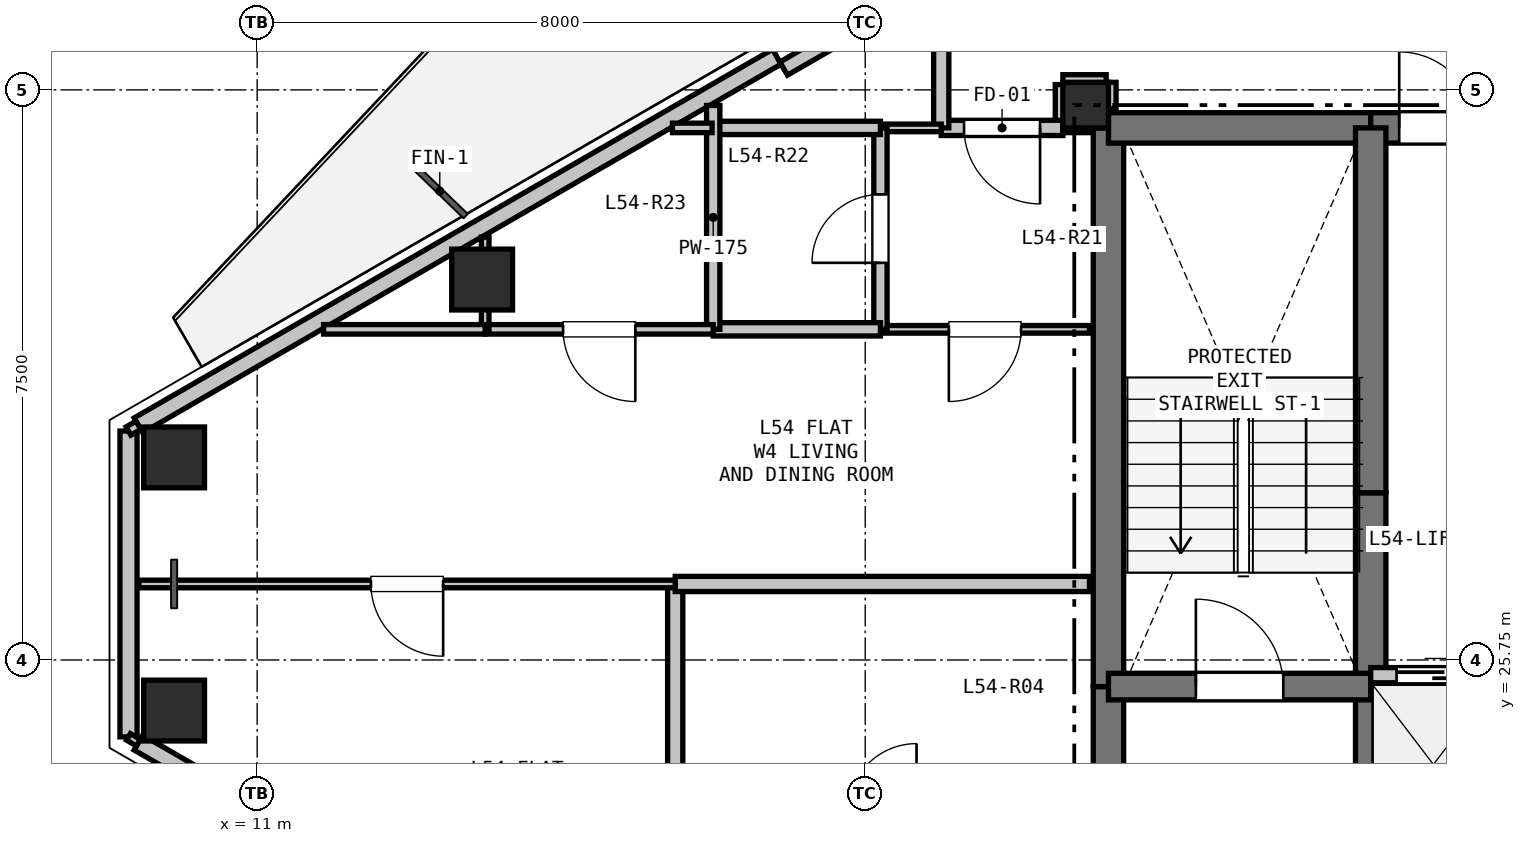
"""IFC4 building model, lengths in metres.
Left out: names, types, materials, properties, quantities, classifications, styles, units other than length and angle.
Written with IfcOpenShell. Run it as: python <this file> out.ifc"""

import sys

from ifc_helpers import new_model, si_unit, direction, frame, frame_2d, origin, origin_2d, place, context, subcontext, project, spatial, rectangle, hollow_rectangle, extrude, element, fill, save


model = new_model("IFC4")
c1 = context("Model", 3, precision=1e-05, world=origin(), true_north=direction((0.0, 1.0)))
c2 = subcontext(c1, "Body", "Model", "MODEL_VIEW")
j1 = project(units=[si_unit("LENGTHUNIT", "METRE"), si_unit("PLANEANGLEUNIT", "RADIAN")], contexts=[c1])
p1 = place(None, origin())
s1 = spatial("IfcSite", under=j1, at=p1, CompositionType="ELEMENT")
p2 = place(p1, origin())
s2 = spatial("IfcBuilding", under=s1, at=p2, CompositionType="ELEMENT")
p3 = place(p2, frame((0.0, 0.0, 195.3)))
s3 = spatial("IfcBuildingStorey", under=s2, at=p3, CompositionType="ELEMENT", Elevation=195.3)
p4 = place(p3, frame((21.9, 33.05, 0.0), z_axis=(0.0, 0.0, 1.0), x_axis=(1.0, 0.0, 0.0)))
e1 = element("IfcColumn", 1, at=p4, inside=s3, PredefinedType="COLUMN", context=c2, shape_type="SweptSolid", body=[
    extrude(rectangle(XDim=0.6, YDim=0.6, at=origin_2d()), origin(), (0.0, 0.0, 1.0), 3.3),
])
for number, where, z_axis, x_axis in (
    (2, (9.907, 28.415, 0.0), (0.0, 0.0, 1.0), (1.0, 0.0, 0.0)),
    (3, (13.96, 30.755, 0.0), (0.0, 0.0, 1.0), (1.0, 0.0, 0.0)),
    (4, (9.907, 25.085, 0.0), (0.0, 0.0, 1.0), (1.0, 0.0, 0.0)),
):
    element("IfcColumn", number, at=place(p3, frame(where, z_axis=z_axis, x_axis=x_axis)), inside=s3, PredefinedType="COLUMN", context=c2, shape_type="SweptSolid", body=[
        extrude(hollow_rectangle(XDim=0.8, YDim=0.8, WallThickness=0.025, at=origin_2d()), origin(), (0.0, 0.0, 1.0), 3.3),
    ])
p5 = place(p3, frame((9.308, 24.738, 0.0), z_axis=(0.0, 0.0, 1.0), x_axis=(0.0, 1.0, 0.0)))
e5 = element("IfcWall", 5, at=p5, inside=s3, PredefinedType="SOLIDWALL", context=c2, shape_type="SweptSolid", body=[
    extrude(rectangle(XDim=4.023, YDim=0.225, at=frame_2d((2.012, 0.0))), origin(), (0.0, 0.0, 1.0), 2.69),
])
p6 = place(p3, frame((9.438, 28.837, 0.0), z_axis=(0.0, 0.0, 1.0), x_axis=(0.866027133173, 0.499997004599, 0.0)))
e6 = element("IfcWall", 6, at=p6, inside=s3, PredefinedType="SOLIDWALL", context=c2, shape_type="SweptSolid", body=[
    extrude(rectangle(XDim=9.699, YDim=0.225, at=frame_2d((4.849, 0.0))), origin(), (0.0, 0.0, 1.0), 2.69),
])
p7 = place(p3, frame((17.927, 33.53, 0.0), z_axis=(0.0, 0.0, 1.0), x_axis=(0.86605165483, 0.499954529098, 0.0)))
e7 = element("IfcWall", 7, at=p7, inside=s3, PredefinedType="PARAPET", context=c2, shape_type="SweptSolid", body=[
    extrude(rectangle(XDim=1.7, YDim=0.2, at=frame_2d((0.85, 0.0))), origin(), (0.0, 0.0, 1.0), 2.69),
])
p8 = place(p3, frame((17.837, 19.814, 0.0), z_axis=(0.0, 0.0, 1.0), x_axis=(-0.866027133173, 0.499997004599, 0.0)))
e8 = element("IfcWall", 8, at=p8, inside=s3, PredefinedType="SOLIDWALL", context=c2, shape_type="SweptSolid", body=[
    extrude(rectangle(XDim=9.699, YDim=0.225, at=frame_2d((4.849, 0.0))), origin(), (0.0, 0.0, 1.0), 2.69),
])
p9 = place(p8, frame((5.108, 0.0, 0.9)))
e9 = element("IfcOpeningElement", 9, at=p9, cuts=e8, PredefinedType="OPENING", context=c2, shape_type="SweptSolid", body=[
    extrude(rectangle(XDim=1.2, YDim=1.4, at=frame_2d((0.6, 0.7))), frame((0.0, 0.123, 0.0), z_axis=(0.0, -1.0, 0.0), x_axis=(1.0, 0.0, 0.0)), (0.0, 0.0, 1.0), 0.245),
])
p10 = place(p3, frame((22.2, 20.75, 0.0), z_axis=(0.0, 0.0, 1.0), x_axis=(0.0, 1.0, 0.0)))
e10 = element("IfcWall", 10, at=p10, inside=s3, PredefinedType="SHEAR", context=c2, shape_type="SweptSolid", body=[
    extrude(rectangle(XDim=4.65, YDim=0.4, at=frame_2d((2.325, 0.0))), origin(), (0.0, 0.0, 1.0), 3.07),
])
p11 = place(p3, frame((22.2, 25.4, 0.0), z_axis=(0.0, 0.0, 1.0), x_axis=(0.0, 1.0, 0.0)))
e11 = element("IfcWall", 11, at=p11, inside=s3, PredefinedType="SHEAR", context=c2, shape_type="SweptSolid", body=[
    extrude(rectangle(XDim=7.35, YDim=0.4, at=frame_2d((3.675, 0.0))), origin(), (0.0, 0.0, 1.0), 3.07),
])
p12 = place(p3, frame((22.2, 32.75, 0.0), z_axis=(0.0, 0.0, 1.0), x_axis=(1.0, 0.0, 0.0)))
e12 = element("IfcWall", 12, at=p12, inside=s3, PredefinedType="SHEAR", context=c2, shape_type="SweptSolid", body=[
    extrude(rectangle(XDim=3.45, YDim=0.4, at=frame_2d((1.725, 0.0))), origin(), (0.0, 0.0, 1.0), 3.07),
])
p13 = place(p3, frame((25.65, 32.75, 0.0), z_axis=(0.0, 0.0, 1.0), x_axis=(1.0, 0.0, 0.0)))
e13 = element("IfcWall", 13, at=p13, inside=s3, PredefinedType="SHEAR", context=c2, shape_type="SweptSolid", body=[
    extrude(rectangle(XDim=1.75, YDim=0.4, at=frame_2d((0.875, 0.0))), origin(), (0.0, 0.0, 1.0), 3.07),
])
p14 = place(p13, frame((0.375, 0.0, 0.0)))
e14 = element("IfcOpeningElement", 14, at=p14, cuts=e13, PredefinedType="OPENING", context=c2, shape_type="SweptSolid", body=[
    extrude(rectangle(XDim=1.0, YDim=2.15, at=frame_2d((0.5, 1.075))), frame((0.0, 0.21, 0.0), z_axis=(0.0, -1.0, 0.0), x_axis=(1.0, 0.0, 0.0)), (0.0, 0.0, 1.0), 0.42),
])
p15 = place(p3, frame((25.65, 22.75, 0.0), z_axis=(0.0, 0.0, 1.0), x_axis=(0.0, 1.0, 0.0)))
e15 = element("IfcWall", 15, at=p15, inside=s3, PredefinedType="SHEAR", context=c2, shape_type="SweptSolid", body=[
    extrude(rectangle(XDim=2.8, YDim=0.4, at=frame_2d((1.4, 0.0))), origin(), (0.0, 0.0, 1.0), 3.07),
])
p16 = place(p3, frame((25.65, 25.55, 0.0), z_axis=(0.0, 0.0, 1.0), x_axis=(0.0, 1.0, 0.0)))
e16 = element("IfcWall", 16, at=p16, inside=s3, PredefinedType="SHEAR", context=c2, shape_type="SweptSolid", body=[
    extrude(rectangle(XDim=2.4, YDim=0.4, at=frame_2d((1.2, 0.0))), origin(), (0.0, 0.0, 1.0), 3.07),
])
p17 = place(p3, frame((25.65, 27.95, 0.0), z_axis=(0.0, 0.0, 1.0), x_axis=(0.0, 1.0, 0.0)))
e17 = element("IfcWall", 17, at=p17, inside=s3, PredefinedType="SHEAR", context=c2, shape_type="SweptSolid", body=[
    extrude(rectangle(XDim=4.8, YDim=0.4, at=frame_2d((2.4, 0.0))), origin(), (0.0, 0.0, 1.0), 3.07),
])
p18 = place(p3, frame((22.2, 25.4, 0.0), z_axis=(0.0, 0.0, 1.0), x_axis=(1.0, 0.0, 0.0)))
e18 = element("IfcWall", 18, at=p18, inside=s3, PredefinedType="SHEAR", context=c2, shape_type="SweptSolid", body=[
    extrude(rectangle(XDim=3.45, YDim=0.35, at=frame_2d((1.725, 0.0))), origin(), (0.0, 0.0, 1.0), 3.07),
])
p19 = place(p18, frame((1.15, 0.0, 0.0)))
e19 = element("IfcOpeningElement", 19, at=p19, cuts=e18, PredefinedType="OPENING", context=c2, shape_type="SweptSolid", body=[
    extrude(rectangle(XDim=1.15, YDim=2.15, at=frame_2d((0.575, 1.075))), frame((0.0, 0.185, 0.0), z_axis=(0.0, -1.0, 0.0), x_axis=(1.0, 0.0, 0.0)), (0.0, 0.0, 1.0), 0.37),
])
p20 = place(p3, frame((25.65, 25.55, 0.0), z_axis=(0.0, 0.0, 1.0), x_axis=(1.0, 0.0, 0.0)))
e20 = element("IfcWall", 20, at=p20, inside=s3, PredefinedType="PARTITIONING", context=c2, shape_type="SweptSolid", body=[
    extrude(rectangle(XDim=4.95, YDim=0.2, at=frame_2d((2.475, 0.0))), origin(), (0.0, 0.0, 1.0), 3.07),
])
p21 = place(p20, frame((0.34, 0.0, 0.0)))
e21 = element("IfcOpeningElement", 21, at=p21, cuts=e20, PredefinedType="OPENING", context=c2, shape_type="SweptSolid", body=[
    extrude(rectangle(XDim=1.1, YDim=2.15, at=frame_2d((0.55, 1.075))), frame((0.0, 0.11, 0.0), z_axis=(0.0, -1.0, 0.0), x_axis=(1.0, 0.0, 0.0)), (0.0, 0.0, 1.0), 0.22),
])
p22 = place(p20, frame((1.99, 0.0, 0.0)))
e22 = element("IfcOpeningElement", 22, at=p22, cuts=e20, PredefinedType="OPENING", context=c2, shape_type="SweptSolid", body=[
    extrude(rectangle(XDim=1.1, YDim=2.15, at=frame_2d((0.55, 1.075))), frame((0.0, 0.11, 0.0), z_axis=(0.0, -1.0, 0.0), x_axis=(1.0, 0.0, 0.0)), (0.0, 0.0, 1.0), 0.22),
])
p23 = place(p20, frame((3.64, 0.0, 0.0)))
e23 = element("IfcOpeningElement", 23, at=p23, cuts=e20, PredefinedType="OPENING", context=c2, shape_type="SweptSolid", body=[
    extrude(rectangle(XDim=1.1, YDim=2.15, at=frame_2d((0.55, 1.075))), frame((0.0, 0.11, 0.0), z_axis=(0.0, -1.0, 0.0), x_axis=(1.0, 0.0, 0.0)), (0.0, 0.0, 1.0), 0.22),
])
p24 = place(p3, frame((22.2, 33.0, 0.0), z_axis=(0.0, 0.0, 1.0), x_axis=(0.0, 1.0, 0.0)))
e24 = element("IfcWall", 24, at=p24, inside=s3, PredefinedType="PARTITIONING", context=c2, shape_type="SweptSolid", body=[
    extrude(rectangle(XDim=0.35, YDim=0.2, at=frame_2d((0.175, 0.0))), origin(), (0.0, 0.0, 1.0), 2.595),
])
p25 = place(p3, frame((22.17, 33.35, 0.0), z_axis=(0.0, 0.0, 1.0), x_axis=(-1.0, 0.0, 0.0)))
e25 = element("IfcWall", 25, at=p25, inside=s3, PredefinedType="PARTITIONING", context=c2, shape_type="SweptSolid", body=[
    extrude(rectangle(XDim=0.57, YDim=0.2, at=frame_2d((0.285, 0.0))), origin(), (0.0, 0.0, 1.0), 3.07),
])
p26 = place(p3, frame((21.6, 33.32, 0.0), z_axis=(0.0, 0.0, 1.0), x_axis=(0.0, -1.0, 0.0)))
e26 = element("IfcWall", 26, at=p26, inside=s3, PredefinedType="PARTITIONING", context=c2, shape_type="SweptSolid", body=[
    extrude(rectangle(XDim=0.57, YDim=0.2, at=frame_2d((0.285, 0.0))), origin(), (0.0, 0.0, 1.0), 2.518),
])
p27 = place(p3, frame((21.6, 32.75, 0.0), z_axis=(0.0, 0.0, 1.0), x_axis=(-1.0, 0.0, 0.0)))
e27 = element("IfcWall", 27, at=p27, inside=s3, PredefinedType="PARTITIONING", context=c2, shape_type="SweptSolid", body=[
    extrude(rectangle(XDim=1.6, YDim=0.2, at=frame_2d((0.8, 0.0))), origin(), (0.0, 0.0, 1.0), 2.518),
])
p28 = place(p27, frame((0.3, 0.0, 0.0)))
e28 = element("IfcOpeningElement", 28, at=p28, cuts=e27, PredefinedType="OPENING", context=c2, shape_type="SweptSolid", body=[
    extrude(rectangle(XDim=1.0, YDim=2.15, at=frame_2d((0.5, 1.075))), frame((0.0, 0.11, 0.0), z_axis=(0.0, -1.0, 0.0), x_axis=(1.0, 0.0, 0.0)), (0.0, 0.0, 1.0), 0.22),
])
p29 = place(p3, frame((20.0, 32.75, 0.0), z_axis=(0.0, 0.0, 1.0), x_axis=(0.0, 1.0, 0.0)))
e29 = element("IfcWall", 29, at=p29, inside=s3, PredefinedType="PARTITIONING", context=c2, shape_type="SweptSolid", body=[
    extrude(rectangle(XDim=2.141, YDim=0.2, at=frame_2d((1.071, 0.0))), origin(), (0.0, 0.0, 1.0), 2.365),
])
p30 = place(p3, frame((19.2, 32.75, 0.0), z_axis=(0.0, 0.0, 1.0), x_axis=(1.0, 0.0, 0.0)))
e30 = element("IfcWall", 30, at=p30, inside=s3, PredefinedType="PARTITIONING", context=c2, shape_type="SweptSolid", body=[
    extrude(rectangle(XDim=0.8, YDim=0.1, at=frame_2d((0.4, 0.0))), origin(), (0.0, 0.0, 1.0), 3.07),
])
p31 = place(p3, frame((21.6, 32.75, 0.0), z_axis=(0.0, 0.0, 1.0), x_axis=(1.0, 0.0, 0.0)))
e31 = element("IfcWall", 31, at=p31, inside=s3, PredefinedType="PARTITIONING", context=c2, shape_type="SweptSolid", body=[
    extrude(rectangle(XDim=0.35, YDim=0.125, at=frame_2d((0.175, 0.0))), origin(), (0.0, 0.0, 1.0), 2.595),
])
p32 = place(p3, frame((21.95, 30.1, 0.0), z_axis=(0.0, 0.0, 1.0), x_axis=(-1.0, 0.0, 0.0)))
e32 = element("IfcWall", 32, at=p32, inside=s3, PredefinedType="PARTITIONING", context=c2, shape_type="SweptSolid", body=[
    extrude(rectangle(XDim=2.75, YDim=0.1, at=frame_2d((1.375, 0.0))), origin(), (0.0, 0.0, 1.0), 2.595),
])
p33 = place(p32, frame((0.9, 0.0, 0.0)))
e33 = element("IfcOpeningElement", 33, at=p33, cuts=e32, PredefinedType="OPENING", context=c2, shape_type="SweptSolid", body=[
    extrude(rectangle(XDim=0.95, YDim=2.1, at=frame_2d((0.475, 1.05))), frame((0.0, 0.06, 0.0), z_axis=(0.0, -1.0, 0.0), x_axis=(1.0, 0.0, 0.0)), (0.0, 0.0, 1.0), 0.12),
])
p34 = place(p3, frame((19.2, 30.1, 0.0), z_axis=(0.0, 0.0, 1.0), x_axis=(0.0, 1.0, 0.0)))
e34 = element("IfcWall", 34, at=p34, inside=s3, PredefinedType="PLUMBINGWALL", context=c2, shape_type="SweptSolid", body=[
    extrude(rectangle(XDim=2.65, YDim=0.175, at=frame_2d((1.325, 0.0))), origin(), (0.0, 0.0, 1.0), 2.518),
])
p35 = place(p34, frame((0.875, 0.0, 0.0)))
e35 = element("IfcOpeningElement", 35, at=p35, cuts=e34, PredefinedType="OPENING", context=c2, shape_type="SweptSolid", body=[
    extrude(rectangle(XDim=0.9, YDim=2.1, at=frame_2d((0.45, 1.05))), frame((0.0, 0.097, 0.0), z_axis=(0.0, -1.0, 0.0), x_axis=(1.0, 0.0, 0.0)), (0.0, 0.0, 1.0), 0.195),
])
p36 = place(p3, frame((17.0, 32.75, 0.0), z_axis=(0.0, 0.0, 1.0), x_axis=(1.0, 0.0, 0.0)))
e36 = element("IfcWall", 36, at=p36, inside=s3, PredefinedType="PLUMBINGWALL", context=c2, shape_type="SweptSolid", body=[
    extrude(rectangle(XDim=2.2, YDim=0.175, at=frame_2d((1.1, 0.0))), origin(), (0.0, 0.0, 1.0), 2.365),
])
p37 = place(p3, frame((19.2, 30.1, 0.0), z_axis=(0.0, 0.0, 1.0), x_axis=(-1.0, 0.0, 0.0)))
e37 = element("IfcWall", 37, at=p37, inside=s3, PredefinedType="PLUMBINGWALL", context=c2, shape_type="SweptSolid", body=[
    extrude(rectangle(XDim=2.2, YDim=0.175, at=frame_2d((1.1, 0.0))), origin(), (0.0, 0.0, 1.0), 3.07),
])
p38 = place(p3, frame((17.0, 30.1, 0.0), z_axis=(0.0, 0.0, 1.0), x_axis=(0.0, 1.0, 0.0)))
e38 = element("IfcWall", 38, at=p38, inside=s3, PredefinedType="PLUMBINGWALL", context=c2, shape_type="SweptSolid", body=[
    extrude(rectangle(XDim=2.945, YDim=0.175, at=frame_2d((1.473, 0.0))), origin(), (0.0, 0.0, 1.0), 2.365),
])
p39 = place(p3, frame((17.0, 30.1, 0.0), z_axis=(0.0, 0.0, 1.0), x_axis=(-1.0, 0.0, 0.0)))
e39 = element("IfcWall", 39, at=p39, inside=s3, PredefinedType="PARTITIONING", context=c2, shape_type="SweptSolid", body=[
    extrude(rectangle(XDim=3.0, YDim=0.125, at=frame_2d((1.5, 0.0))), origin(), (0.0, 0.0, 1.0), 3.07),
])
p40 = place(p39, frame((1.025, 0.0, 0.0)))
e40 = element("IfcOpeningElement", 40, at=p40, cuts=e39, PredefinedType="OPENING", context=c2, shape_type="SweptSolid", body=[
    extrude(rectangle(XDim=0.95, YDim=2.1, at=frame_2d((0.475, 1.05))), frame((0.0, 0.073, 0.0), z_axis=(0.0, -1.0, 0.0), x_axis=(1.0, 0.0, 0.0)), (0.0, 0.0, 1.0), 0.145),
])
p41 = place(p3, frame((14.0, 30.1, 0.0), z_axis=(0.0, 0.0, 1.0), x_axis=(0.0, 1.0, 0.0)))
e41 = element("IfcWall", 41, at=p41, inside=s3, PredefinedType="PARTITIONING", context=c2, shape_type="SweptSolid", body=[
    extrude(rectangle(XDim=1.213, YDim=0.1, at=frame_2d((0.606, 0.0))), origin(), (0.0, 0.0, 1.0), 3.07),
])
p42 = place(p3, frame((16.464, 32.75, 0.0), z_axis=(0.0, 0.0, 1.0), x_axis=(1.0, 0.0, 0.0)))
e42 = element("IfcWall", 42, at=p42, inside=s3, PredefinedType="PARTITIONING", context=c2, shape_type="SweptSolid", body=[
    extrude(rectangle(XDim=0.521, YDim=0.125, at=frame_2d((0.261, 0.0))), origin(), (0.0, 0.0, 1.0), 3.07),
])
p43 = place(p3, frame((16.5, 23.75, 0.0), z_axis=(0.0, 0.0, 1.0), x_axis=(0.0, 1.0, 0.0)))
e43 = element("IfcWall", 43, at=p43, inside=s3, PredefinedType="PARTITIONING", context=c2, shape_type="SweptSolid", body=[
    extrude(rectangle(XDim=3.0, YDim=0.2, at=frame_2d((1.5, 0.0))), origin(), (0.0, 0.0, 1.0), 3.07),
])
p44 = place(p3, frame((16.5, 26.75, 0.0), z_axis=(0.0, 0.0, 1.0), x_axis=(1.0, 0.0, 0.0)))
e44 = element("IfcWall", 44, at=p44, inside=s3, PredefinedType="PARTITIONING", context=c2, shape_type="SweptSolid", body=[
    extrude(rectangle(XDim=5.45, YDim=0.2, at=frame_2d((2.725, 0.0))), origin(), (0.0, 0.0, 1.0), 2.595),
])
p45 = place(p3, frame((11.874, 30.1, 0.0), z_axis=(0.0, 0.0, 1.0), x_axis=(1.0, 0.0, 0.0)))
e45 = element("IfcWall", 45, at=p45, inside=s3, PredefinedType="PARTITIONING", context=c2, shape_type="SweptSolid", body=[
    extrude(rectangle(XDim=2.126, YDim=0.125, at=frame_2d((1.063, 0.0))), origin(), (0.0, 0.0, 1.0), 2.795),
])
p46 = place(p3, frame((16.5, 26.75, 0.0), z_axis=(0.0, 0.0, 1.0), x_axis=(-1.0, 0.0, 0.0)))
e46 = element("IfcWall", 46, at=p46, inside=s3, PredefinedType="PARTITIONING", context=c2, shape_type="SweptSolid", body=[
    extrude(rectangle(XDim=7.056, YDim=0.1, at=frame_2d((3.528, 0.0))), origin(), (0.0, 0.0, 1.0), 2.795),
])
p47 = place(p46, frame((3.053, 0.0, 0.0)))
e47 = element("IfcOpeningElement", 47, at=p47, cuts=e46, PredefinedType="OPENING", context=c2, shape_type="SweptSolid", body=[
    extrude(rectangle(XDim=0.95, YDim=2.1, at=frame_2d((0.475, 1.05))), frame((0.0, 0.06, 0.0), z_axis=(0.0, -1.0, 0.0), x_axis=(1.0, 0.0, 0.0)), (0.0, 0.0, 1.0), 0.12),
])
p48 = place(p3, frame((9.307, 28.762, 0.0), z_axis=(0.0, 0.0, 1.0), x_axis=(0.866239593359, 0.499628829129, 0.0)))
e48 = element("IfcWall", 48, at=p48, inside=s3, PredefinedType="PARTITIONING", context=c2, shape_type="SweptSolid", body=[
    extrude(rectangle(XDim=0.15, YDim=0.125, at=frame_2d((0.075, 0.0))), origin(), (0.0, 0.0, 1.0), 3.07),
])
p49 = place(p3, frame((9.437, 24.663, 0.0), z_axis=(0.0, 0.0, 1.0), x_axis=(-0.865833797362, 0.500331725305, 0.0)))
e49 = element("IfcWall", 49, at=p49, inside=s3, PredefinedType="PARTITIONING", context=c2, shape_type="SweptSolid", body=[
    extrude(rectangle(XDim=0.15, YDim=0.1, at=frame_2d((0.075, 0.0))), origin(), (0.0, 0.0, 1.0), 3.07),
])
p50 = place(p21, origin())
e50 = element("IfcDoor", 50, at=p50, inside=s3, OperationType="SLIDING_TO_LEFT", PredefinedType="DOOR", context=c2, shape_type="SweptSolid", body=[
    extrude(rectangle(XDim=1.1, YDim=2.15, at=frame_2d((0.55, 1.075))), frame((0.0, 0.025, 0.0), z_axis=(0.0, -1.0, 0.0), x_axis=(1.0, 0.0, 0.0)), (0.0, 0.0, 1.0), 0.05),
])
fill(e21, e50)
p51 = place(p14, origin())
e51 = element("IfcDoor", 51, at=p51, inside=s3, OperationType="SINGLE_SWING_LEFT", PredefinedType="DOOR", context=c2, shape_type="SweptSolid", body=[
    extrude(rectangle(XDim=1.0, YDim=2.15, at=frame_2d((0.5, 1.075))), frame((0.0, 0.025, 0.0), z_axis=(0.0, -1.0, 0.0), x_axis=(1.0, 0.0, 0.0)), (0.0, 0.0, 1.0), 0.05),
])
fill(e14, e51)
p52 = place(p19, origin())
e52 = element("IfcDoor", 52, at=p52, inside=s3, OperationType="SINGLE_SWING_LEFT", PredefinedType="DOOR", context=c2, shape_type="SweptSolid", body=[
    extrude(rectangle(XDim=1.15, YDim=2.15, at=frame_2d((0.575, 1.075))), frame((0.0, 0.025, 0.0), z_axis=(0.0, -1.0, 0.0), x_axis=(1.0, 0.0, 0.0)), (0.0, 0.0, 1.0), 0.05),
])
fill(e19, e52)
p53 = place(p28, origin())
e53 = element("IfcDoor", 53, at=p53, inside=s3, OperationType="SINGLE_SWING_LEFT", PredefinedType="DOOR", context=c2, shape_type="SweptSolid", body=[
    extrude(rectangle(XDim=1.0, YDim=2.15, at=frame_2d((0.5, 1.075))), frame((0.0, 0.025, 0.0), z_axis=(0.0, -1.0, 0.0), x_axis=(1.0, 0.0, 0.0)), (0.0, 0.0, 1.0), 0.05),
])
fill(e28, e53)
p54 = place(p35, origin())
e54 = element("IfcDoor", 54, at=p54, inside=s3, OperationType="SINGLE_SWING_LEFT", PredefinedType="DOOR", context=c2, shape_type="SweptSolid", body=[
    extrude(rectangle(XDim=0.9, YDim=2.1, at=frame_2d((0.45, 1.05))), frame((0.0, 0.025, 0.0), z_axis=(0.0, -1.0, 0.0), x_axis=(1.0, 0.0, 0.0)), (0.0, 0.0, 1.0), 0.05),
])
fill(e35, e54)
p55 = place(p33, origin())
e55 = element("IfcDoor", 55, at=p55, inside=s3, OperationType="SINGLE_SWING_RIGHT", PredefinedType="DOOR", context=c2, shape_type="SweptSolid", body=[
    extrude(rectangle(XDim=0.95, YDim=2.1, at=frame_2d((0.475, 1.05))), frame((0.0, 0.025, 0.0), z_axis=(0.0, -1.0, 0.0), x_axis=(1.0, 0.0, 0.0)), (0.0, 0.0, 1.0), 0.05),
])
fill(e33, e55)
p56 = place(p40, origin())
e56 = element("IfcDoor", 56, at=p56, inside=s3, OperationType="SINGLE_SWING_LEFT", PredefinedType="DOOR", context=c2, shape_type="SweptSolid", body=[
    extrude(rectangle(XDim=0.95, YDim=2.1, at=frame_2d((0.475, 1.05))), frame((0.0, 0.025, 0.0), z_axis=(0.0, -1.0, 0.0), x_axis=(1.0, 0.0, 0.0)), (0.0, 0.0, 1.0), 0.05),
])
fill(e40, e56)
p57 = place(p47, origin())
e57 = element("IfcDoor", 57, at=p57, inside=s3, OperationType="SINGLE_SWING_LEFT", PredefinedType="DOOR", context=c2, shape_type="SweptSolid", body=[
    extrude(rectangle(XDim=0.95, YDim=2.1, at=frame_2d((0.475, 1.05))), frame((0.0, 0.025, 0.0), z_axis=(0.0, -1.0, 0.0), x_axis=(1.0, 0.0, 0.0)), (0.0, 0.0, 1.0), 0.05),
])
fill(e47, e57)
save(model, sys.argv[1])
